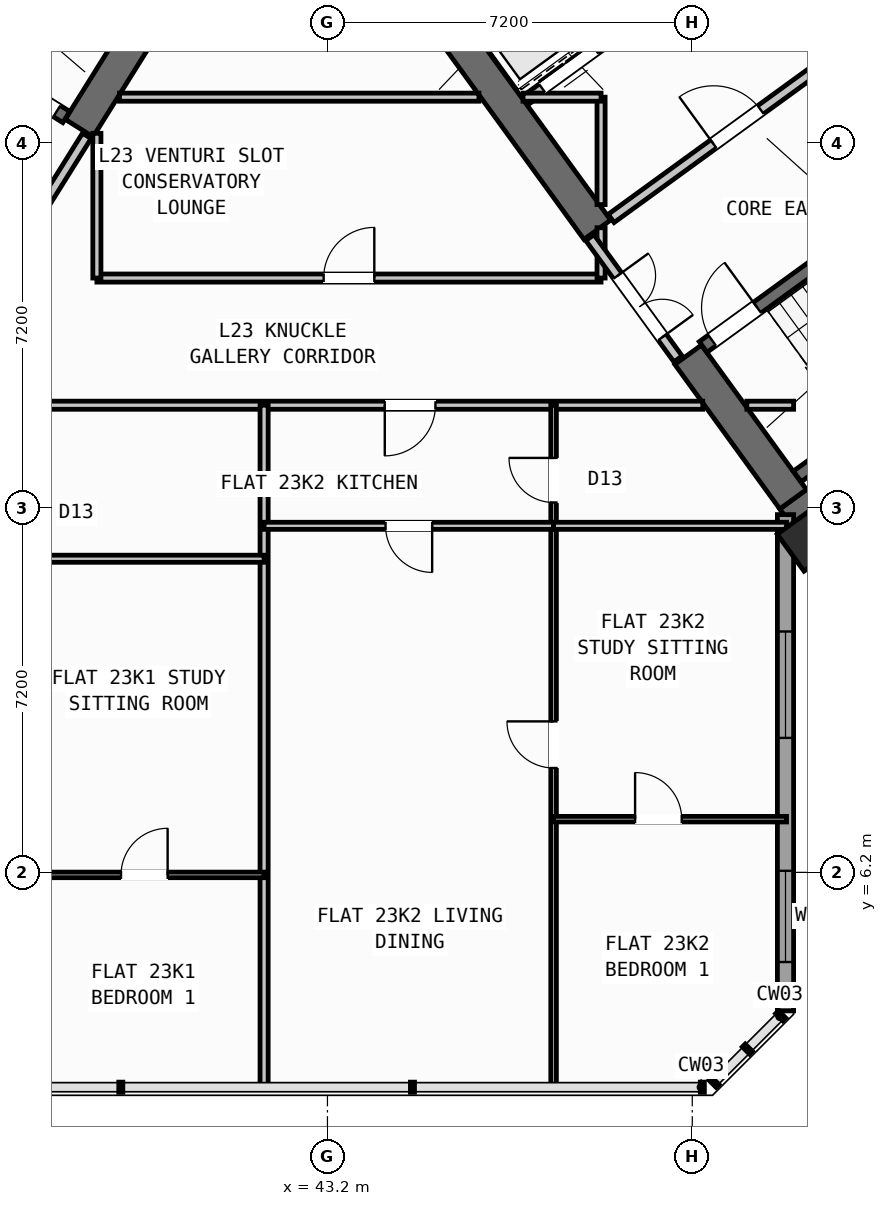
"""IFC4 building model, lengths in metres.
Left out: names, types, materials, properties, quantities, classifications, styles, units other than length and angle.
Written with IfcOpenShell. Run it as: python <this file> out.ifc"""

import sys

from ifc_helpers import new_model, si_unit, direction, frame, frame_2d, origin, origin_2d, place, context, subcontext, project, spatial, rectangle, hollow_rectangle, extrude, source, transform, mapped, element, fill, save


model = new_model("IFC4")
c1 = context("Model", 3, precision=1e-05, world=origin(), true_north=direction((0.0, 1.0)))
c2 = subcontext(c1, "Body", "Model", "MODEL_VIEW")
j1 = project(units=[si_unit("LENGTHUNIT", "METRE"), si_unit("PLANEANGLEUNIT", "RADIAN")], contexts=[c1])
p1 = place(None, origin())
s1 = spatial("IfcSite", under=j1, at=p1, CompositionType="ELEMENT")
p2 = place(p1, origin())
s2 = spatial("IfcBuilding", under=s1, at=p2, CompositionType="ELEMENT")
p3 = place(p2, frame((0.0, 0.0, 93.6)))
s3 = spatial("IfcBuildingStorey", under=s2, at=p3, CompositionType="ELEMENT", Elevation=93.6)
p4 = place(p3, frame((40.168, 23.88, 0.0), z_axis=(0.0, 0.0, 1.0), x_axis=(-0.529893103397, -0.8480644427, 0.0)))
e1 = element("IfcWall", 1, at=p4, inside=s3, PredefinedType="SHEAR", context=c2, shape_type="SweptSolid", body=[
    extrude(rectangle(XDim=3.525, YDim=0.65, at=frame_2d((1.763, 0.0))), origin(), (0.0, 0.0, 1.0), 3.35),
])
p5 = place(p3, frame((52.318, 13.11, 0.0), z_axis=(0.0, 0.0, 1.0), x_axis=(0.809019445368, 0.587781878776, 0.0)))
e2 = element("IfcWall", 2, at=p5, inside=s3, PredefinedType="SHEAR", context=c2, shape_type="SweptSolid", body=[
    extrude(rectangle(XDim=12.44, YDim=0.65, at=frame_2d((6.22, 0.0))), origin(), (0.0, 0.0, 1.0), 3.35),
])
p6 = place(p3, frame((52.39, 13.564, 0.0), z_axis=(0.0, 0.0, 1.0), x_axis=(-0.58779688989, 0.809008539037, 0.0)))
e3 = element("IfcWall", 3, at=p6, inside=s3, PredefinedType="SHEAR", context=c2, shape_type="SweptSolid", body=[
    extrude(rectangle(XDim=3.525, YDim=0.65, at=frame_2d((1.763, 0.0))), origin(), (0.0, 0.0, 1.0), 3.35),
])
p7 = place(p3, frame((48.526, 18.884, 0.0), z_axis=(0.0, 0.0, 1.0), x_axis=(-0.58777996584, 0.809020835181, 0.0)))
e4 = element("IfcWall", 4, at=p7, inside=s3, PredefinedType="SHEAR", context=c2, shape_type="SweptSolid", body=[
    extrude(rectangle(XDim=6.375, YDim=0.65, at=frame_2d((3.188, 0.0))), origin(), (0.0, 0.0, 1.0), 3.35),
])
m1 = source(origin(), c2, "Body", "SweptSolid", [
    extrude(hollow_rectangle(XDim=0.9, YDim=0.9, WallThickness=0.036, at=origin_2d()), origin(), (0.0, 0.0, 1.0), 3.6),
])
p8 = place(p3, frame((52.705, 12.773, 0.0), z_axis=(0.0, 0.0, 1.0), x_axis=(0.809016994375, 0.587785252292, 0.0)))
e5 = element("IfcColumn", 5, at=p8, inside=s3, PredefinedType="COLUMN", context=c2, shape_type="MappedRepresentation", body=[
    mapped(m1, transform((0.0, 0.0, 0.0), scale=1.0)),
])
p9 = place(p3, frame((52.24, 13.261, 0.0), z_axis=(0.0, 0.0, 1.0), x_axis=(0.0, -1.0, 0.0)))
e6 = element("IfcWall", 6, at=p9, inside=s3, PredefinedType="STANDARD", context=c2, shape_type="SweptSolid", body=[
    extrude(rectangle(XDim=9.795, YDim=0.32, at=frame_2d((4.897, 0.0))), origin(), (0.0, 0.0, 1.0), 3.35),
])
p10 = place(p9, frame((2.307, 0.0, 0.8)))
e7 = element("IfcOpeningElement", 7, at=p10, cuts=e6, PredefinedType="OPENING", context=c2, shape_type="SweptSolid", body=[
    extrude(rectangle(XDim=2.1, YDim=1.55, at=frame_2d((1.05, 0.775))), frame((0.0, 0.17, 0.0), z_axis=(0.0, -1.0, 0.0), x_axis=(1.0, 0.0, 0.0)), (0.0, 0.0, 1.0), 0.34),
])
p11 = place(p9, frame((7.03, 0.0, 0.85)))
e8 = element("IfcOpeningElement", 8, at=p11, cuts=e6, PredefinedType="OPENING", context=c2, shape_type="SweptSolid", body=[
    extrude(rectangle(XDim=1.8, YDim=1.5, at=frame_2d((0.9, 0.75))), frame((0.0, 0.17, 0.0), z_axis=(0.0, -1.0, 0.0), x_axis=(1.0, 0.0, 0.0)), (0.0, 0.0, 1.0), 0.34),
])
p12 = place(p3, frame((38.046, 21.108, 0.0), z_axis=(0.0, 0.0, 1.0), x_axis=(-0.848054434086, 0.529909121291, 0.0)))
e9 = element("IfcWall", 9, at=p12, inside=s3, PredefinedType="SHEAR", context=c2, shape_type="SweptSolid", body=[
    extrude(rectangle(XDim=7.33, YDim=0.26, at=frame_2d((3.665, 0.0))), origin(), (0.0, 0.0, 1.0), 3.35),
])
p13 = place(p12, frame((0.22, 0.0, 0.0)))
e10 = element("IfcOpeningElement", 10, at=p13, cuts=e9, PredefinedType="OPENING", context=c2, shape_type="SweptSolid", body=[
    extrude(rectangle(XDim=1.1, YDim=2.1, at=frame_2d((0.55, 1.05))), frame((0.0, 0.14, 0.0), z_axis=(0.0, -1.0, 0.0), x_axis=(1.0, 0.0, 0.0)), (0.0, 0.0, 1.0), 0.28),
])
p14 = place(p3, frame((52.472, 14.013, 0.0), z_axis=(0.0, 0.0, 1.0), x_axis=(0.809028366311, 0.587769599847, 0.0)))
e11 = element("IfcWall", 11, at=p14, inside=s3, PredefinedType="SHEAR", context=c2, shape_type="SweptSolid", body=[
    extrude(rectangle(XDim=7.33, YDim=0.26, at=frame_2d((3.665, 0.0))), origin(), (0.0, 0.0, 1.0), 3.35),
])
p15 = place(p3, frame((50.615, 16.57, 0.0), z_axis=(0.0, 0.0, 1.0), x_axis=(0.809028366311, 0.587769599847, 0.0)))
e12 = element("IfcWall", 12, at=p15, inside=s3, PredefinedType="SHEAR", context=c2, shape_type="SweptSolid", body=[
    extrude(rectangle(XDim=7.33, YDim=0.26, at=frame_2d((3.665, 0.0))), origin(), (0.0, 0.0, 1.0), 3.35),
])
p16 = place(p15, frame((0.22, 0.0, 0.0)))
e13 = element("IfcOpeningElement", 13, at=p16, cuts=e12, PredefinedType="OPENING", context=c2, shape_type="SweptSolid", body=[
    extrude(rectangle(XDim=1.1, YDim=2.1, at=frame_2d((0.55, 1.05))), frame((0.0, 0.14, 0.0), z_axis=(0.0, -1.0, 0.0), x_axis=(1.0, 0.0, 0.0)), (0.0, 0.0, 1.0), 0.28),
])
p17 = place(p3, frame((47.106, 21.437, 0.0), z_axis=(0.0, 0.0, 1.0), x_axis=(0.809012514015, 0.58779141893, 0.0)))
e14 = element("IfcWall", 14, at=p17, inside=s3, PredefinedType="STANDARD", context=c2, shape_type="SweptSolid", body=[
    extrude(rectangle(XDim=3.398, YDim=0.2, at=frame_2d((1.699, 0.0))), origin(), (0.0, 0.0, 1.0), 3.34),
])
p18 = place(p17, frame((0.408, 0.0, 0.0)))
e15 = element("IfcOpeningElement", 15, at=p18, cuts=e14, PredefinedType="OPENING", context=c2, shape_type="SweptSolid", body=[
    extrude(rectangle(XDim=1.3, YDim=2.2, at=frame_2d((0.65, 1.1))), frame((0.0, 0.11, 0.0), z_axis=(0.0, -1.0, 0.0), x_axis=(1.0, 0.0, 0.0)), (0.0, 0.0, 1.0), 0.22),
])
p19 = place(p3, frame((48.799, 19.107, 0.0), z_axis=(0.0, 0.0, 1.0), x_axis=(0.809012959416, 0.587790805897, 0.0)))
e16 = element("IfcWall", 16, at=p19, inside=s3, PredefinedType="STANDARD", context=c2, shape_type="SweptSolid", body=[
    extrude(rectangle(XDim=5.718, YDim=0.2, at=frame_2d((2.859, 0.0))), origin(), (0.0, 0.0, 1.0), 3.34),
])
p20 = place(p19, frame((2.498, 0.0, 0.0)))
e17 = element("IfcOpeningElement", 17, at=p20, cuts=e16, PredefinedType="OPENING", context=c2, shape_type="SweptSolid", body=[
    extrude(rectangle(XDim=1.15, YDim=2.1, at=frame_2d((0.575, 1.05))), frame((0.0, 0.11, 0.0), z_axis=(0.0, -1.0, 0.0), x_axis=(1.0, 0.0, 0.0)), (0.0, 0.0, 1.0), 0.22),
])
p21 = place(p3, frame((38.451, 20.737, 0.0), z_axis=(0.0, 0.0, 1.0), x_axis=(-0.529924799939, -0.848044637038, 0.0)))
e18 = element("IfcWall", 18, at=p21, inside=s3, PredefinedType="STANDARD", context=c2, shape_type="SweptSolid", body=[
    extrude(rectangle(XDim=2.96, YDim=0.2, at=frame_2d((1.48, 0.0))), origin(), (0.0, 0.0, 1.0), 3.34),
])
p22 = place(p21, frame((1.46, 0.0, 0.0)))
e19 = element("IfcOpeningElement", 19, at=p22, cuts=e18, PredefinedType="OPENING", context=c2, shape_type="SweptSolid", body=[
    extrude(rectangle(XDim=0.86, YDim=2.05, at=frame_2d((0.43, 1.025))), frame((0.0, 0.11, 0.0), z_axis=(0.0, -1.0, 0.0), x_axis=(1.0, 0.0, 0.0)), (0.0, 0.0, 1.0), 0.22),
])
p23 = place(p3, frame((35.296, 15.42, 0.0), z_axis=(0.0, 0.0, 1.0), x_axis=(1.0, 0.0, 0.0)))
e20 = element("IfcWall", 20, at=p23, inside=s3, PredefinedType="PARTITIONING", context=c2, shape_type="SweptSolid", body=[
    extrude(rectangle(XDim=15.311, YDim=0.16, at=frame_2d((7.655, 0.0))), origin(), (0.0, 0.0, 1.0), 3.34),
])
p24 = place(p23, frame((0.615, 0.0, 0.0)))
e21 = element("IfcOpeningElement", 21, at=p24, cuts=e20, PredefinedType="OPENING", context=c2, shape_type="SweptSolid", body=[
    extrude(rectangle(XDim=1.0, YDim=2.1, at=frame_2d((0.5, 1.05))), frame((0.0, 0.09, 0.0), z_axis=(0.0, -1.0, 0.0), x_axis=(1.0, 0.0, 0.0)), (0.0, 0.0, 1.0), 0.18),
])
p25 = place(p23, frame((9.035, 0.0, 0.0)))
e22 = element("IfcOpeningElement", 22, at=p25, cuts=e20, PredefinedType="OPENING", context=c2, shape_type="SweptSolid", body=[
    extrude(rectangle(XDim=1.0, YDim=2.1, at=frame_2d((0.5, 1.05))), frame((0.0, 0.09, 0.0), z_axis=(0.0, -1.0, 0.0), x_axis=(1.0, 0.0, 0.0)), (0.0, 0.0, 1.0), 0.18),
])
p26 = place(p3, frame((51.477, 15.42, 0.0), z_axis=(0.0, 0.0, 1.0), x_axis=(1.0, 0.0, 0.0)))
e23 = element("IfcWall", 23, at=p26, inside=s3, PredefinedType="PARTITIONING", context=c2, shape_type="SweptSolid", body=[
    extrude(rectangle(XDim=0.923, YDim=0.16, at=frame_2d((0.461, 0.0))), origin(), (0.0, 0.0, 1.0), 3.34),
])
p27 = place(p3, frame((38.65, 17.93, 0.0), z_axis=(0.0, 0.0, 1.0), x_axis=(1.0, 0.0, 0.0)))
e24 = element("IfcWall", 24, at=p27, inside=s3, PredefinedType="PARTITIONING", context=c2, shape_type="SweptSolid", body=[
    extrude(rectangle(XDim=9.95, YDim=0.16, at=frame_2d((4.975, 0.0))), origin(), (0.0, 0.0, 1.0), 3.34),
])
p28 = place(p27, frame((4.475, 0.0, 0.0)))
e25 = element("IfcOpeningElement", 25, at=p28, cuts=e24, PredefinedType="OPENING", context=c2, shape_type="SweptSolid", body=[
    extrude(rectangle(XDim=1.0, YDim=2.1, at=frame_2d((0.5, 1.05))), frame((0.0, 0.09, 0.0), z_axis=(0.0, -1.0, 0.0), x_axis=(1.0, 0.0, 0.0)), (0.0, 0.0, 1.0), 0.18),
])
p29 = place(p3, frame((38.65, 17.93, 0.0), z_axis=(0.0, 0.0, 1.0), x_axis=(0.0, 1.0, 0.0)))
e26 = element("IfcWall", 26, at=p29, inside=s3, PredefinedType="PARTITIONING", context=c2, shape_type="SweptSolid", body=[
    extrude(rectangle(XDim=2.857, YDim=0.16, at=frame_2d((1.428, 0.0))), origin(), (0.0, 0.0, 1.0), 3.34),
])
p30 = place(p3, frame((48.6, 17.93, 0.0), z_axis=(0.0, 0.0, 1.0), x_axis=(0.0, 1.0, 0.0)))
e27 = element("IfcWall", 27, at=p30, inside=s3, PredefinedType="PARTITIONING", context=c2, shape_type="SweptSolid", body=[
    extrude(rectangle(XDim=0.993, YDim=0.16, at=frame_2d((0.496, 0.0))), origin(), (0.0, 0.0, 1.0), 3.34),
])
p31 = place(p3, frame((48.6, 19.38, 0.0), z_axis=(0.0, 0.0, 1.0), x_axis=(0.0, 1.0, 0.0)))
e28 = element("IfcWall", 28, at=p31, inside=s3, PredefinedType="PARTITIONING", context=c2, shape_type="SweptSolid", body=[
    extrude(rectangle(XDim=2.12, YDim=0.16, at=frame_2d((1.06, 0.0))), origin(), (0.0, 0.0, 1.0), 3.34),
])
p32 = place(p3, frame((39.095, 21.5, 0.0), z_axis=(0.0, 0.0, 1.0), x_axis=(1.0, 0.0, 0.0)))
e29 = element("IfcWall", 29, at=p32, inside=s3, PredefinedType="PARTITIONING", context=c2, shape_type="SweptSolid", body=[
    extrude(rectangle(XDim=7.094, YDim=0.16, at=frame_2d((3.547, 0.0))), origin(), (0.0, 0.0, 1.0), 3.34),
])
p33 = place(p3, frame((47.06, 21.5, 0.0), z_axis=(0.0, 0.0, 1.0), x_axis=(1.0, 0.0, 0.0)))
e30 = element("IfcWall", 30, at=p33, inside=s3, PredefinedType="PARTITIONING", context=c2, shape_type="SweptSolid", body=[
    extrude(rectangle(XDim=1.54, YDim=0.16, at=frame_2d((0.77, 0.0))), origin(), (0.0, 0.0, 1.0), 3.34),
])
p34 = place(p3, frame((50.119, 16.333, 0.0), z_axis=(0.0, 0.0, 1.0), x_axis=(-0.587749856981, 0.809042709391, 0.0)))
e31 = element("IfcWall", 31, at=p34, inside=s3, PredefinedType="STANDARD", context=c2, shape_type="SweptSolid", body=[
    extrude(rectangle(XDim=2.96, YDim=0.2, at=frame_2d((1.48, 0.0))), origin(), (0.0, 0.0, 1.0), 3.34),
])
p35 = place(p34, frame((0.53, 0.0, 0.0)))
e32 = element("IfcOpeningElement", 32, at=p35, cuts=e31, PredefinedType="OPENING", context=c2, shape_type="SweptSolid", body=[
    extrude(rectangle(XDim=1.5, YDim=2.15, at=frame_2d((0.75, 1.075))), frame((0.0, 0.11, 0.0), z_axis=(0.0, -1.0, 0.0), x_axis=(1.0, 0.0, 0.0)), (0.0, 0.0, 1.0), 0.22),
])
p36 = place(p3, frame((41.95, 1.96, 0.0), z_axis=(0.0, 0.0, 1.0), x_axis=(0.0, 1.0, 0.0)))
e33 = element("IfcWall", 33, at=p36, inside=s3, PredefinedType="PARTITIONING", context=c2, shape_type="SweptSolid", body=[
    extrude(rectangle(XDim=13.46, YDim=0.16, at=frame_2d((6.73, 0.0))), origin(), (0.0, 0.0, 1.0), 3.34),
])
p37 = place(p3, frame((37.222, 12.39, 0.0), z_axis=(0.0, 0.0, 1.0), x_axis=(1.0, 0.0, 0.0)))
e34 = element("IfcWall", 34, at=p37, inside=s3, PredefinedType="PLUMBINGWALL", context=c2, shape_type="SweptSolid", body=[
    extrude(rectangle(XDim=4.728, YDim=0.14, at=frame_2d((2.364, 0.0))), origin(), (0.0, 0.0, 1.0), 2.525),
])
p38 = place(p3, frame((37.222, 6.15, 0.0), z_axis=(0.0, 0.0, 1.0), x_axis=(1.0, 0.0, 0.0)))
e35 = element("IfcWall", 35, at=p38, inside=s3, PredefinedType="PARTITIONING", context=c2, shape_type="SweptSolid", body=[
    extrude(rectangle(XDim=4.728, YDim=0.11, at=frame_2d((2.364, 0.0))), origin(), (0.0, 0.0, 1.0), 3.34),
])
p39 = place(p38, frame((1.904, 0.0, 0.0)))
e36 = element("IfcOpeningElement", 36, at=p39, cuts=e35, PredefinedType="OPENING", context=c2, shape_type="SweptSolid", body=[
    extrude(rectangle(XDim=0.92, YDim=2.08, at=frame_2d((0.46, 1.04))), frame((0.0, 0.065, 0.0), z_axis=(0.0, -1.0, 0.0), x_axis=(1.0, 0.0, 0.0)), (0.0, 0.0, 1.0), 0.13),
])
p40 = place(p3, frame((47.663, 1.96, 0.0), z_axis=(0.0, 0.0, 1.0), x_axis=(0.0, 1.0, 0.0)))
e37 = element("IfcWall", 37, at=p40, inside=s3, PredefinedType="PARTITIONING", context=c2, shape_type="SweptSolid", body=[
    extrude(rectangle(XDim=13.46, YDim=0.11, at=frame_2d((6.73, 0.0))), origin(), (0.0, 0.0, 1.0), 3.34),
])
p41 = place(p40, frame((6.3, 0.0, 0.0)))
e38 = element("IfcOpeningElement", 38, at=p41, cuts=e37, PredefinedType="OPENING", context=c2, shape_type="SweptSolid", body=[
    extrude(rectangle(XDim=0.92, YDim=2.08, at=frame_2d((0.46, 1.04))), frame((0.0, 0.065, 0.0), z_axis=(0.0, -1.0, 0.0), x_axis=(1.0, 0.0, 0.0)), (0.0, 0.0, 1.0), 0.13),
])
p42 = place(p40, frame((11.54, 0.0, 0.0)))
e39 = element("IfcOpeningElement", 39, at=p42, cuts=e37, PredefinedType="OPENING", context=c2, shape_type="SweptSolid", body=[
    extrude(rectangle(XDim=0.88, YDim=2.08, at=frame_2d((0.44, 1.04))), frame((0.0, 0.065, 0.0), z_axis=(0.0, -1.0, 0.0), x_axis=(1.0, 0.0, 0.0)), (0.0, 0.0, 1.0), 0.13),
])
p43 = place(p3, frame((41.95, 13.04, 0.0), z_axis=(0.0, 0.0, 1.0), x_axis=(1.0, 0.0, 0.0)))
e40 = element("IfcWall", 40, at=p43, inside=s3, PredefinedType="PLUMBINGWALL", context=c2, shape_type="SweptSolid", body=[
    extrude(rectangle(XDim=5.713, YDim=0.14, at=frame_2d((2.856, 0.0))), origin(), (0.0, 0.0, 1.0), 3.34),
])
p44 = place(p43, frame((2.396, 0.0, 0.0)))
e41 = element("IfcOpeningElement", 41, at=p44, cuts=e40, PredefinedType="OPENING", context=c2, shape_type="SweptSolid", body=[
    extrude(rectangle(XDim=0.92, YDim=2.08, at=frame_2d((0.46, 1.04))), frame((0.0, 0.08, 0.0), z_axis=(0.0, -1.0, 0.0), x_axis=(1.0, 0.0, 0.0)), (0.0, 0.0, 1.0), 0.16),
])
p45 = place(p3, frame((47.663, 13.04, 0.0), z_axis=(0.0, 0.0, 1.0), x_axis=(1.0, 0.0, 0.0)))
e42 = element("IfcWall", 42, at=p45, inside=s3, PredefinedType="PLUMBINGWALL", context=c2, shape_type="SweptSolid", body=[
    extrude(rectangle(XDim=4.597, YDim=0.14, at=frame_2d((2.298, 0.0))), origin(), (0.0, 0.0, 1.0), 2.525),
])
p46 = place(p3, frame((47.663, 7.25, 0.0), z_axis=(0.0, 0.0, 1.0), x_axis=(1.0, 0.0, 0.0)))
e43 = element("IfcWall", 43, at=p46, inside=s3, PredefinedType="PARTITIONING", context=c2, shape_type="SweptSolid", body=[
    extrude(rectangle(XDim=4.597, YDim=0.11, at=frame_2d((2.298, 0.0))), origin(), (0.0, 0.0, 1.0), 3.34),
])
p47 = place(p46, frame((1.608, 0.0, 0.0)))
e44 = element("IfcOpeningElement", 44, at=p47, cuts=e43, PredefinedType="OPENING", context=c2, shape_type="SweptSolid", body=[
    extrude(rectangle(XDim=0.92, YDim=2.08, at=frame_2d((0.46, 1.04))), frame((0.0, 0.065, 0.0), z_axis=(0.0, -1.0, 0.0), x_axis=(1.0, 0.0, 0.0)), (0.0, 0.0, 1.0), 0.13),
])
m2 = source(origin(), c2, "Body", "SweptSolid", [
    extrude(rectangle(XDim=2.1, YDim=1.55, at=frame_2d((1.05, 0.775))), frame((0.0, 0.03, 0.0), z_axis=(0.0, -1.0, 0.0), x_axis=(1.0, 0.0, 0.0)), (0.0, 0.0, 1.0), 0.06),
])
p48 = place(p10, origin())
e45 = element("IfcWindow", 45, at=p48, inside=s3, PartitioningType="SINGLE_PANEL", PredefinedType="WINDOW", context=c2, shape_type="MappedRepresentation", body=[
    mapped(m2, transform((0.0, 0.0, 0.0), scale=1.0)),
])
fill(e7, e45)
m3 = source(origin(), c2, "Body", "SweptSolid", [
    extrude(rectangle(XDim=1.8, YDim=1.5, at=frame_2d((0.9, 0.75))), frame((0.0, 0.03, 0.0), z_axis=(0.0, -1.0, 0.0), x_axis=(1.0, 0.0, 0.0)), (0.0, 0.0, 1.0), 0.06),
])
p49 = place(p11, origin())
e46 = element("IfcWindow", 46, at=p49, inside=s3, PartitioningType="SINGLE_PANEL", PredefinedType="WINDOW", context=c2, shape_type="MappedRepresentation", body=[
    mapped(m3, transform((0.0, 0.0, 0.0), scale=1.0)),
])
fill(e8, e46)
m4 = source(origin(), c2, "Body", "SweptSolid", [
    extrude(rectangle(XDim=1.1, YDim=2.1, at=frame_2d((0.55, 1.05))), frame((0.0, 0.025, 0.0), z_axis=(0.0, -1.0, 0.0), x_axis=(1.0, 0.0, 0.0)), (0.0, 0.0, 1.0), 0.05),
])
p50 = place(p13, origin())
e47 = element("IfcDoor", 47, at=p50, inside=s3, OperationType="SINGLE_SWING_RIGHT", PredefinedType="DOOR", context=c2, shape_type="MappedRepresentation", body=[
    mapped(m4, transform((0.0, 0.0, 0.0), scale=1.0)),
])
fill(e10, e47)
p51 = place(p16, origin())
e48 = element("IfcDoor", 48, at=p51, inside=s3, OperationType="SINGLE_SWING_RIGHT", PredefinedType="DOOR", context=c2, shape_type="MappedRepresentation", body=[
    mapped(m4, transform((0.0, 0.0, 0.0), scale=1.0)),
])
fill(e13, e48)
m5 = source(origin(), c2, "Body", "SweptSolid", [
    extrude(rectangle(XDim=1.15, YDim=2.1, at=frame_2d((0.575, 1.05))), frame((0.0, 0.025, 0.0), z_axis=(0.0, -1.0, 0.0), x_axis=(1.0, 0.0, 0.0)), (0.0, 0.0, 1.0), 0.05),
])
p52 = place(p20, origin())
e49 = element("IfcDoor", 49, at=p52, inside=s3, OperationType="SINGLE_SWING_LEFT", PredefinedType="DOOR", context=c2, shape_type="MappedRepresentation", body=[
    mapped(m5, transform((0.0, 0.0, 0.0), scale=1.0)),
])
fill(e17, e49)
m6 = source(origin(), c2, "Body", "SweptSolid", [
    extrude(rectangle(XDim=1.3, YDim=2.2, at=frame_2d((0.65, 1.1))), frame((0.0, 0.025, 0.0), z_axis=(0.0, -1.0, 0.0), x_axis=(1.0, 0.0, 0.0)), (0.0, 0.0, 1.0), 0.05),
])
p53 = place(p18, origin())
e50 = element("IfcDoor", 50, at=p53, inside=s3, OperationType="DOUBLE_DOOR_SLIDING", PredefinedType="DOOR", context=c2, shape_type="MappedRepresentation", body=[
    mapped(m6, transform((0.0, 0.0, 0.0), scale=1.0)),
])
fill(e15, e50)
m7 = source(origin(), c2, "Body", "SweptSolid", [
    extrude(rectangle(XDim=1.0, YDim=2.1, at=frame_2d((0.5, 1.05))), frame((0.0, 0.025, 0.0), z_axis=(0.0, -1.0, 0.0), x_axis=(1.0, 0.0, 0.0)), (0.0, 0.0, 1.0), 0.05),
])
p54 = place(p28, origin())
e51 = element("IfcDoor", 51, at=p54, inside=s3, OperationType="SINGLE_SWING_RIGHT", PredefinedType="DOOR", context=c2, shape_type="MappedRepresentation", body=[
    mapped(m7, transform((0.0, 0.0, 0.0), scale=1.0)),
])
fill(e25, e51)
m8 = source(origin(), c2, "Body", "SweptSolid", [
    extrude(rectangle(XDim=1.5, YDim=2.15, at=frame_2d((0.75, 1.075))), frame((0.0, 0.025, 0.0), z_axis=(0.0, -1.0, 0.0), x_axis=(1.0, 0.0, 0.0)), (0.0, 0.0, 1.0), 0.05),
])
p55 = place(p35, frame((1.5, 0.0, 0.0), z_axis=(0.0, 0.0, 1.0), x_axis=(-1.0, 0.0, 0.0)))
e52 = element("IfcDoor", 52, at=p55, inside=s3, OperationType="DOUBLE_DOOR_SINGLE_SWING", PredefinedType="DOOR", context=c2, shape_type="MappedRepresentation", body=[
    mapped(m8, transform((0.0, 0.0, 0.0), scale=1.0)),
])
fill(e32, e52)
m9 = source(origin(), c2, "Body", "SweptSolid", [
    extrude(rectangle(XDim=0.92, YDim=2.08, at=frame_2d((0.46, 1.04))), frame((0.0, 0.025, 0.0), z_axis=(0.0, -1.0, 0.0), x_axis=(1.0, 0.0, 0.0)), (0.0, 0.0, 1.0), 0.05),
])
p56 = place(p39, origin())
e53 = element("IfcDoor", 53, at=p56, inside=s3, OperationType="SINGLE_SWING_RIGHT", PredefinedType="DOOR", context=c2, shape_type="MappedRepresentation", body=[
    mapped(m9, transform((0.0, 0.0, 0.0), scale=1.0)),
])
fill(e36, e53)
p57 = place(p41, origin())
e54 = element("IfcDoor", 54, at=p57, inside=s3, OperationType="SINGLE_SWING_RIGHT", PredefinedType="DOOR", context=c2, shape_type="MappedRepresentation", body=[
    mapped(m9, transform((0.0, 0.0, 0.0), scale=1.0)),
])
fill(e38, e54)
p58 = place(p47, origin())
e55 = element("IfcDoor", 55, at=p58, inside=s3, OperationType="SINGLE_SWING_LEFT", PredefinedType="DOOR", context=c2, shape_type="MappedRepresentation", body=[
    mapped(m9, transform((0.0, 0.0, 0.0), scale=1.0)),
])
fill(e44, e55)
p59 = place(p25, frame((1.0, 0.0, 0.0), z_axis=(0.0, 0.0, 1.0), x_axis=(-1.0, 0.0, 0.0)))
e56 = element("IfcDoor", 56, at=p59, inside=s3, OperationType="SINGLE_SWING_RIGHT", PredefinedType="DOOR", context=c2, shape_type="MappedRepresentation", body=[
    mapped(m7, transform((0.0, 0.0, 0.0), scale=1.0)),
])
fill(e22, e56)
p60 = place(p44, frame((0.92, 0.0, 0.0), z_axis=(0.0, 0.0, 1.0), x_axis=(-1.0, 0.0, 0.0)))
e57 = element("IfcDoor", 57, at=p60, inside=s3, OperationType="SINGLE_SWING_LEFT", PredefinedType="DOOR", context=c2, shape_type="MappedRepresentation", body=[
    mapped(m9, transform((0.0, 0.0, 0.0), scale=1.0)),
])
fill(e41, e57)
m10 = source(origin(), c2, "Body", "SweptSolid", [
    extrude(rectangle(XDim=0.88, YDim=2.08, at=frame_2d((0.44, 1.04))), frame((0.0, 0.025, 0.0), z_axis=(0.0, -1.0, 0.0), x_axis=(1.0, 0.0, 0.0)), (0.0, 0.0, 1.0), 0.05),
])
p61 = place(p42, origin())
e58 = element("IfcDoor", 58, at=p61, inside=s3, OperationType="SINGLE_SWING_RIGHT", PredefinedType="DOOR", context=c2, shape_type="MappedRepresentation", body=[
    mapped(m10, transform((0.0, 0.0, 0.0), scale=1.0)),
])
fill(e39, e58)
save(model, sys.argv[1])
